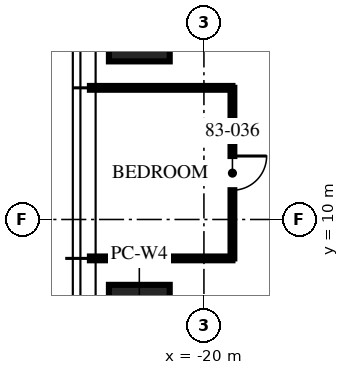
"""IFC4 building model, lengths in metres.
Left out: names, types, materials, properties, quantities, classifications, styles, units other than length and angle.
Written with IfcOpenShell. Run it as: python <this file> out.ifc"""

import sys

from ifc_helpers import new_model, si_unit, direction, frame, frame_2d, origin, origin_2d, place, context, subcontext, project, spatial, rectangle, extrude, element, fill, save


model = new_model("IFC4")
c1 = context("Model", 3, precision=1e-05, world=origin(), true_north=direction((0.0, 1.0)))
c2 = subcontext(c1, "Body", "Model", "MODEL_VIEW")
j1 = project(units=[si_unit("LENGTHUNIT", "METRE"), si_unit("PLANEANGLEUNIT", "RADIAN")], contexts=[c1])
p1 = place(None, origin())
s1 = spatial("IfcSite", under=j1, at=p1, CompositionType="ELEMENT")
p2 = place(p1, origin())
s2 = spatial("IfcBuilding", under=s1, at=p2, CompositionType="ELEMENT")
p3 = place(p2, frame((0.0, 0.0, 330.75)))
s3 = spatial("IfcBuildingStorey", under=s2, at=p3, CompositionType="ELEMENT", Elevation=330.75)
for number, where, z_axis, x_axis in (
    (1, (-21.7, 7.48, 0.0), (0.0, 0.0, 1.0), (0.0, 1.0, 0.0)),
    (2, (-21.7, 14.96, 0.0), (0.0, 0.0, 1.0), (0.0, 1.0, 0.0)),
):
    element("IfcColumn", number, at=place(p3, frame(where, z_axis=z_axis, x_axis=x_axis)), inside=s3, PredefinedType="COLUMN", context=c2, shape_type="SweptSolid", body=[
        extrude(rectangle(XDim=1.6, YDim=1.6, at=origin_2d()), origin(), (0.0, 0.0, 1.0), 3.75),
    ])
for number, where, z_axis, x_axis in (
    (3, (-19.25, 13.464, 0.0), (0.0, 0.0, 1.0), (-1.0, 0.0, 0.0)),
    (4, (-19.25, 8.976, 0.0), (0.0, 0.0, 1.0), (-1.0, 0.0, 0.0)),
):
    element("IfcWall", number, at=place(p3, frame(where, z_axis=z_axis, x_axis=x_axis)), inside=s3, PredefinedType="PARTITIONING", context=c2, shape_type="SweptSolid", body=[
        extrude(rectangle(XDim=3.75, YDim=0.1, at=frame_2d((1.875, 0.0))), origin(), (0.0, 0.0, 1.0), 3.01),
    ])
p4 = place(p3, frame((-19.25, 13.464, 0.0), z_axis=(0.0, 0.0, 1.0), x_axis=(0.0, -1.0, 0.0)))
e5 = element("IfcWall", 5, at=p4, inside=s3, PredefinedType="PARTITIONING", context=c2, shape_type="SweptSolid", body=[
    extrude(rectangle(XDim=4.488, YDim=0.1, at=frame_2d((2.244, 0.0))), origin(), (0.0, 0.0, 1.0), 2.91),
])
p5 = place(p4, frame((1.794, 0.0, 0.0)))
e6 = element("IfcOpeningElement", 6, at=p5, cuts=e5, PredefinedType="OPENING", context=c2, shape_type="SweptSolid", body=[
    extrude(rectangle(XDim=0.9, YDim=2.1, at=frame_2d((0.45, 1.05))), frame((0.0, 0.06, 0.0), z_axis=(0.0, -1.0, 0.0), x_axis=(1.0, 0.0, 0.0)), (0.0, 0.0, 1.0), 0.12),
])
p6 = place(p5, origin())
e7 = element("IfcDoor", 7, at=p6, inside=s3, OperationType="SINGLE_SWING_LEFT", PredefinedType="DOOR", context=c2, shape_type="SweptSolid", body=[
    extrude(rectangle(XDim=0.9, YDim=2.1, at=frame_2d((0.45, 1.05))), frame((0.0, 0.025, 0.0), z_axis=(0.0, -1.0, 0.0), x_axis=(1.0, 0.0, 0.0)), (0.0, 0.0, 1.0), 0.05),
])
fill(e6, e7)
save(model, sys.argv[1])
